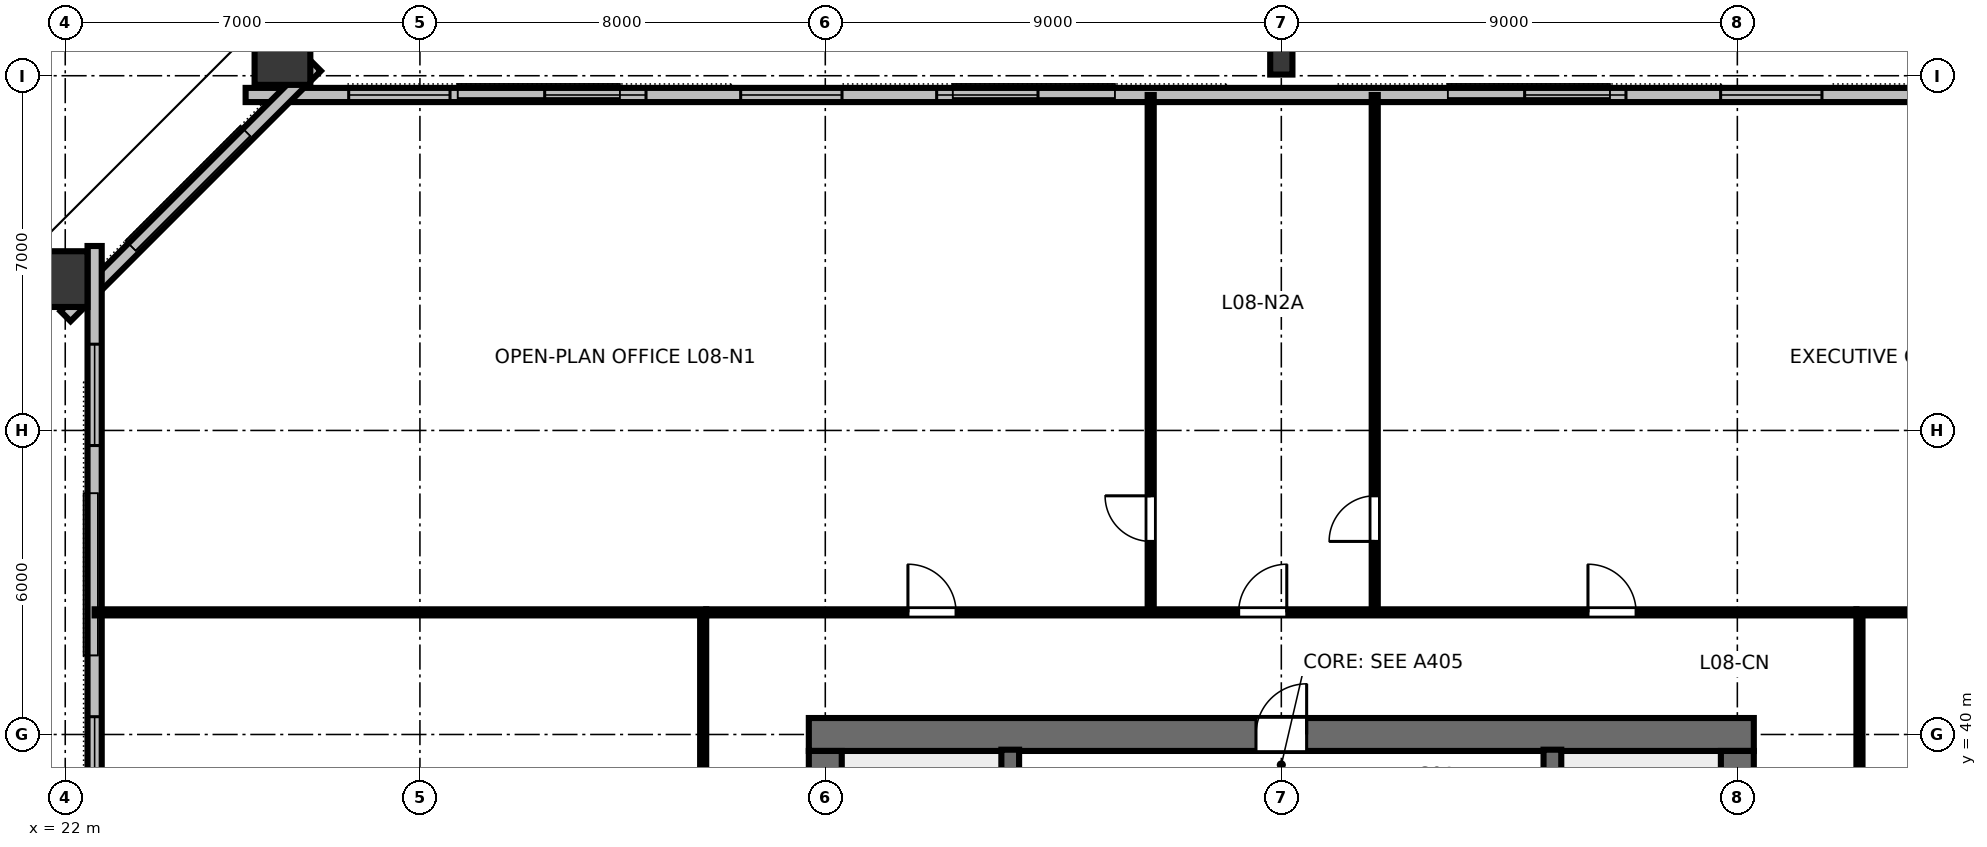
"""IFC4 building model, lengths in metres.
Left out: names, types, materials, properties, quantities, classifications, styles, units other than length and angle.
Written with IfcOpenShell. Run it as: python <this file> out.ifc"""

import sys

from ifc_helpers import new_model, si_unit, direction, frame, frame_2d, origin, origin_2d, place, context, subcontext, project, spatial, rectangle, hollow_rectangle, i_section, extrude, element, fill, save


model = new_model("IFC4")
c1 = context("Model", 3, precision=1e-05, world=origin(), true_north=direction((0.0, 1.0)))
c2 = subcontext(c1, "Body", "Model", "MODEL_VIEW")
j1 = project(units=[si_unit("LENGTHUNIT", "METRE"), si_unit("PLANEANGLEUNIT", "RADIAN")], contexts=[c1])
p1 = place(None, origin())
s1 = spatial("IfcSite", under=j1, at=p1, CompositionType="ELEMENT")
p2 = place(p1, origin())
s2 = spatial("IfcBuilding", under=s1, at=p2, CompositionType="ELEMENT")
p3 = place(p2, frame((0.0, 0.0, 35.2)))
s3 = spatial("IfcBuildingStorey", under=s2, at=p3, CompositionType="ELEMENT", Elevation=35.2)
p4 = place(p3, frame((36.675, 40.0, 0.0), z_axis=(0.0, 0.0, 1.0), x_axis=(1.0, 0.0, 0.0)))
e1 = element("IfcWall", 1, at=p4, inside=s3, PredefinedType="SHEAR", context=c2, shape_type="SweptSolid", body=[
    extrude(rectangle(XDim=18.65, YDim=0.65, at=frame_2d((9.325, 0.0))), origin(), (0.0, 0.0, 1.0), 3.36),
])
p5 = place(p4, frame((8.825, 0.0, 0.0)))
e2 = element("IfcOpeningElement", 2, at=p5, cuts=e1, PredefinedType="OPENING", context=c2, shape_type="SweptSolid", body=[
    extrude(rectangle(XDim=1.0, YDim=2.15, at=frame_2d((0.5, 1.075))), frame((0.0, 0.335, 0.0), z_axis=(0.0, -1.0, 0.0), x_axis=(1.0, 0.0, 0.0)), (0.0, 0.0, 1.0), 0.67),
])
p6 = place(p3, frame((37.0, 24.325, 0.0), z_axis=(0.0, 0.0, 1.0), x_axis=(0.0, 1.0, 0.0)))
e3 = element("IfcWall", 3, at=p6, inside=s3, PredefinedType="SHEAR", context=c2, shape_type="SweptSolid", body=[
    extrude(rectangle(XDim=15.35, YDim=0.65, at=frame_2d((7.675, 0.0))), origin(), (0.0, 0.0, 1.0), 3.36),
])
p7 = place(p6, frame((5.2, 0.0, 0.0)))
e4 = element("IfcOpeningElement", 4, at=p7, cuts=e3, PredefinedType="OPENING", context=c2, shape_type="SweptSolid", body=[
    extrude(rectangle(XDim=1.15, YDim=2.15, at=frame_2d((0.575, 1.075))), frame((0.0, 0.335, 0.0), z_axis=(0.0, -1.0, 0.0), x_axis=(1.0, 0.0, 0.0)), (0.0, 0.0, 1.0), 0.67),
])
p8 = place(p3, frame((55.0, 24.325, 0.0), z_axis=(0.0, 0.0, 1.0), x_axis=(0.0, 1.0, 0.0)))
e5 = element("IfcWall", 5, at=p8, inside=s3, PredefinedType="SHEAR", context=c2, shape_type="SweptSolid", body=[
    extrude(rectangle(XDim=15.35, YDim=0.65, at=frame_2d((7.675, 0.0))), origin(), (0.0, 0.0, 1.0), 3.36),
])
p9 = place(p8, frame((5.2, 0.0, 0.0)))
e6 = element("IfcOpeningElement", 6, at=p9, cuts=e5, PredefinedType="OPENING", context=c2, shape_type="SweptSolid", body=[
    extrude(rectangle(XDim=1.15, YDim=2.15, at=frame_2d((0.575, 1.075))), frame((0.0, 0.335, 0.0), z_axis=(0.0, -1.0, 0.0), x_axis=(1.0, 0.0, 0.0)), (0.0, 0.0, 1.0), 0.67),
])
p10 = place(p3, frame((46.0, 53.28, 0.0), z_axis=(0.0, 0.094885603902, 0.995488182839), x_axis=(-1.0, 0.0, 0.0)))
e7 = element("IfcColumn", 7, at=p10, inside=s3, PredefinedType="COLUMN", context=c2, shape_type="SweptSolid", body=[
    extrude(i_section(OverallWidth=0.439, OverallDepth=0.514, WebThickness=0.06, FlangeThickness=0.097, FilletRadius=0.025, at=origin_2d()), origin(), (0.0, 0.0, 1.0), 3.162),
])
p11 = place(p3, frame((26.287, 53.469, 0.0), z_axis=(-0.047968316961, 0.09439424431, 0.994378583442), x_axis=(-0.891494829719, -0.453030869351, 0.0)))
e8 = element("IfcColumn", 8, at=p11, inside=s3, PredefinedType="COLUMN", context=c2, shape_type="SweptSolid", body=[
    extrude(hollow_rectangle(XDim=1.1, YDim=1.3, WallThickness=0.07, at=origin_2d()), origin(), (0.0, 0.0, 1.0), 3.166),
])
p12 = place(p3, frame((21.789, 48.987, 0.0), z_axis=(-0.10994269781, 0.032281703141, 0.993413556803), x_axis=(0.953174231432, -0.279873863329, 0.114584052814)))
e9 = element("IfcColumn", 9, at=p12, inside=s3, PredefinedType="COLUMN", context=c2, shape_type="SweptSolid", body=[
    extrude(hollow_rectangle(XDim=1.1, YDim=1.3, WallThickness=0.07, at=origin_2d()), origin(), (0.0, 0.0, 1.0), 3.169),
])
p13 = place(p3, frame((66.44, 52.62, 0.0), z_axis=(0.0, 0.0, 1.0), x_axis=(-1.0, 0.0, 0.0)))
e10 = element("IfcWall", 10, at=p13, inside=s3, PredefinedType="STANDARD", context=c2, shape_type="SweptSolid", body=[
    extrude(rectangle(XDim=40.88, YDim=0.28, at=frame_2d((20.44, 0.0))), origin(), (0.0, 0.0, 1.0), 3.15),
])
p14 = place(p13, frame((2.034, 0.0, 0.8)))
e11 = element("IfcOpeningElement", 11, at=p14, cuts=e10, PredefinedType="OPENING", context=c2, shape_type="SweptSolid", body=[
    extrude(rectangle(XDim=2.0, YDim=1.95, at=frame_2d((1.0, 0.975))), frame((0.0, 0.15, 0.0), z_axis=(0.0, -1.0, 0.0), x_axis=(1.0, 0.0, 0.0)), (0.0, 0.0, 1.0), 0.3),
])
p15 = place(p13, frame((5.902, 0.0, 0.8)))
e12 = element("IfcOpeningElement", 12, at=p15, cuts=e10, PredefinedType="OPENING", context=c2, shape_type="SweptSolid", body=[
    extrude(rectangle(XDim=2.0, YDim=1.95, at=frame_2d((1.0, 0.975))), frame((0.0, 0.15, 0.0), z_axis=(0.0, -1.0, 0.0), x_axis=(1.0, 0.0, 0.0)), (0.0, 0.0, 1.0), 0.3),
])
p16 = place(p13, frame((9.77, 0.0, 0.8)))
e13 = element("IfcOpeningElement", 13, at=p16, cuts=e10, PredefinedType="OPENING", context=c2, shape_type="SweptSolid", body=[
    extrude(rectangle(XDim=2.0, YDim=1.95, at=frame_2d((1.0, 0.975))), frame((0.0, 0.15, 0.0), z_axis=(0.0, -1.0, 0.0), x_axis=(1.0, 0.0, 0.0)), (0.0, 0.0, 1.0), 0.3),
])
p17 = place(p13, frame((13.638, 0.0, 0.8)))
e14 = element("IfcOpeningElement", 14, at=p17, cuts=e10, PredefinedType="OPENING", context=c2, shape_type="SweptSolid", body=[
    extrude(rectangle(XDim=2.0, YDim=1.95, at=frame_2d((1.0, 0.975))), frame((0.0, 0.15, 0.0), z_axis=(0.0, -1.0, 0.0), x_axis=(1.0, 0.0, 0.0)), (0.0, 0.0, 1.0), 0.3),
])
p18 = place(p13, frame((25.242, 0.0, 0.8)))
e15 = element("IfcOpeningElement", 15, at=p18, cuts=e10, PredefinedType="OPENING", context=c2, shape_type="SweptSolid", body=[
    extrude(rectangle(XDim=2.0, YDim=1.95, at=frame_2d((1.0, 0.975))), frame((0.0, 0.15, 0.0), z_axis=(0.0, -1.0, 0.0), x_axis=(1.0, 0.0, 0.0)), (0.0, 0.0, 1.0), 0.3),
])
p19 = place(p13, frame((29.11, 0.0, 0.8)))
e16 = element("IfcOpeningElement", 16, at=p19, cuts=e10, PredefinedType="OPENING", context=c2, shape_type="SweptSolid", body=[
    extrude(rectangle(XDim=2.0, YDim=1.95, at=frame_2d((1.0, 0.975))), frame((0.0, 0.15, 0.0), z_axis=(0.0, -1.0, 0.0), x_axis=(1.0, 0.0, 0.0)), (0.0, 0.0, 1.0), 0.3),
])
p20 = place(p13, frame((32.978, 0.0, 0.8)))
e17 = element("IfcOpeningElement", 17, at=p20, cuts=e10, PredefinedType="OPENING", context=c2, shape_type="SweptSolid", body=[
    extrude(rectangle(XDim=2.0, YDim=1.95, at=frame_2d((1.0, 0.975))), frame((0.0, 0.15, 0.0), z_axis=(0.0, -1.0, 0.0), x_axis=(1.0, 0.0, 0.0)), (0.0, 0.0, 1.0), 0.3),
])
p21 = place(p13, frame((36.846, 0.0, 0.8)))
e18 = element("IfcOpeningElement", 18, at=p21, cuts=e10, PredefinedType="OPENING", context=c2, shape_type="SweptSolid", body=[
    extrude(rectangle(XDim=2.0, YDim=1.95, at=frame_2d((1.0, 0.975))), frame((0.0, 0.15, 0.0), z_axis=(0.0, -1.0, 0.0), x_axis=(1.0, 0.0, 0.0)), (0.0, 0.0, 1.0), 0.3),
])
p22 = place(p3, frame((26.946, 53.194, 0.0), z_axis=(0.0, 0.0, 1.0), x_axis=(-0.707106781187, -0.707106781187, 0.0)))
e19 = element("IfcWall", 19, at=p22, inside=s3, PredefinedType="STANDARD", context=c2, shape_type="SweptSolid", body=[
    extrude(rectangle(XDim=6.985, YDim=0.28, at=frame_2d((3.493, 0.0))), origin(), (0.0, 0.0, 1.0), 3.15),
])
p23 = place(p3, frame((22.58, 49.64, 0.0), z_axis=(0.0, 0.0, 1.0), x_axis=(0.0, -1.0, 0.0)))
e20 = element("IfcWall", 20, at=p23, inside=s3, PredefinedType="STANDARD", context=c2, shape_type="SweptSolid", body=[
    extrude(rectangle(XDim=35.28, YDim=0.28, at=frame_2d((17.64, 0.0))), origin(), (0.0, 0.0, 1.0), 3.15),
])
p24 = place(p23, frame((1.938, 0.0, 0.8)))
e21 = element("IfcOpeningElement", 21, at=p24, cuts=e20, PredefinedType="OPENING", context=c2, shape_type="SweptSolid", body=[
    extrude(rectangle(XDim=2.0, YDim=1.95, at=frame_2d((1.0, 0.975))), frame((0.0, 0.15, 0.0), z_axis=(0.0, -1.0, 0.0), x_axis=(1.0, 0.0, 0.0)), (0.0, 0.0, 1.0), 0.3),
])
p25 = place(p23, frame((9.289, 0.0, 0.8)))
e22 = element("IfcOpeningElement", 22, at=p25, cuts=e20, PredefinedType="OPENING", context=c2, shape_type="SweptSolid", body=[
    extrude(rectangle(XDim=2.0, YDim=1.95, at=frame_2d((1.0, 0.975))), frame((0.0, 0.15, 0.0), z_axis=(0.0, -1.0, 0.0), x_axis=(1.0, 0.0, 0.0)), (0.0, 0.0, 1.0), 0.3),
])
p26 = place(p23, frame((12.964, 0.0, 0.8)))
e23 = element("IfcOpeningElement", 23, at=p26, cuts=e20, PredefinedType="OPENING", context=c2, shape_type="SweptSolid", body=[
    extrude(rectangle(XDim=2.0, YDim=1.95, at=frame_2d((1.0, 0.975))), frame((0.0, 0.15, 0.0), z_axis=(0.0, -1.0, 0.0), x_axis=(1.0, 0.0, 0.0)), (0.0, 0.0, 1.0), 0.3),
])
p27 = place(p23, frame((23.991, 0.0, 0.8)))
e24 = element("IfcOpeningElement", 24, at=p27, cuts=e20, PredefinedType="OPENING", context=c2, shape_type="SweptSolid", body=[
    extrude(rectangle(XDim=2.0, YDim=1.95, at=frame_2d((1.0, 0.975))), frame((0.0, 0.15, 0.0), z_axis=(0.0, -1.0, 0.0), x_axis=(1.0, 0.0, 0.0)), (0.0, 0.0, 1.0), 0.3),
])
p28 = place(p23, frame((31.342, 0.0, 0.8)))
e25 = element("IfcOpeningElement", 25, at=p28, cuts=e20, PredefinedType="OPENING", context=c2, shape_type="SweptSolid", body=[
    extrude(rectangle(XDim=2.0, YDim=1.95, at=frame_2d((1.0, 0.975))), frame((0.0, 0.15, 0.0), z_axis=(0.0, -1.0, 0.0), x_axis=(1.0, 0.0, 0.0)), (0.0, 0.0, 1.0), 0.3),
])
for number, where, z_axis, x_axis in (
    (26, (40.65, 32.0, 0.0), (0.0, 0.0, 1.0), (0.0, 1.0, 0.0)),
    (27, (51.35, 32.0, 0.0), (0.0, 0.0, 1.0), (0.0, 1.0, 0.0)),
):
    element("IfcWall", number, at=place(p3, frame(where, z_axis=z_axis, x_axis=x_axis)), inside=s3, PredefinedType="SHEAR", context=c2, shape_type="SweptSolid", body=[
        extrude(rectangle(XDim=7.7, YDim=0.35, at=frame_2d((3.85, 0.0))), origin(), (0.0, 0.0, 1.0), 3.6),
    ])
p29 = place(p3, frame((43.422, 42.41, 0.0), z_axis=(0.0, 0.0, 1.0), x_axis=(0.0, 1.0, 0.0)))
e28 = element("IfcWall", 28, at=p29, inside=s3, PredefinedType="PARTITIONING", context=c2, shape_type="SweptSolid", body=[
    extrude(rectangle(XDim=10.21, YDim=0.12, at=frame_2d((5.105, 0.0))), origin(), (0.0, 0.0, 1.0), 2.43),
])
p30 = place(p29, frame((1.4, 0.0, 0.0)))
e29 = element("IfcOpeningElement", 29, at=p30, cuts=e28, PredefinedType="OPENING", context=c2, shape_type="SweptSolid", body=[
    extrude(rectangle(XDim=0.9, YDim=2.15, at=frame_2d((0.45, 1.075))), frame((0.0, 0.07, 0.0), z_axis=(0.0, -1.0, 0.0), x_axis=(1.0, 0.0, 0.0)), (0.0, 0.0, 1.0), 0.14),
])
p31 = place(p3, frame((47.844, 42.41, 0.0), z_axis=(0.0, 0.0, 1.0), x_axis=(0.0, 1.0, 0.0)))
e30 = element("IfcWall", 30, at=p31, inside=s3, PredefinedType="PARTITIONING", context=c2, shape_type="SweptSolid", body=[
    extrude(rectangle(XDim=10.21, YDim=0.12, at=frame_2d((5.105, 0.0))), origin(), (0.0, 0.0, 1.0), 2.43),
])
p32 = place(p31, frame((1.4, 0.0, 0.0)))
e31 = element("IfcOpeningElement", 31, at=p32, cuts=e30, PredefinedType="OPENING", context=c2, shape_type="SweptSolid", body=[
    extrude(rectangle(XDim=0.9, YDim=2.15, at=frame_2d((0.45, 1.075))), frame((0.0, 0.07, 0.0), z_axis=(0.0, -1.0, 0.0), x_axis=(1.0, 0.0, 0.0)), (0.0, 0.0, 1.0), 0.14),
])
p33 = place(p3, frame((34.65, 42.41, 0.0), z_axis=(0.0, 0.0, 1.0), x_axis=(1.0, 0.0, 0.0)))
e32 = element("IfcWall", 32, at=p33, inside=s3, PredefinedType="PARTITIONING", context=c2, shape_type="SweptSolid", body=[
    extrude(rectangle(XDim=22.7, YDim=0.12, at=frame_2d((11.35, 0.0))), origin(), (0.0, 0.0, 1.0), 2.43),
])
p34 = place(p33, frame((3.981, 0.0, 0.0)))
e33 = element("IfcOpeningElement", 33, at=p34, cuts=e32, PredefinedType="OPENING", context=c2, shape_type="SweptSolid", body=[
    extrude(rectangle(XDim=0.95, YDim=2.15, at=frame_2d((0.475, 1.075))), frame((0.0, 0.07, 0.0), z_axis=(0.0, -1.0, 0.0), x_axis=(1.0, 0.0, 0.0)), (0.0, 0.0, 1.0), 0.14),
])
p35 = place(p33, frame((10.508, 0.0, 0.0)))
e34 = element("IfcOpeningElement", 34, at=p35, cuts=e32, PredefinedType="OPENING", context=c2, shape_type="SweptSolid", body=[
    extrude(rectangle(XDim=0.95, YDim=2.15, at=frame_2d((0.475, 1.075))), frame((0.0, 0.07, 0.0), z_axis=(0.0, -1.0, 0.0), x_axis=(1.0, 0.0, 0.0)), (0.0, 0.0, 1.0), 0.14),
])
p36 = place(p33, frame((17.402, 0.0, 0.0)))
e35 = element("IfcOpeningElement", 35, at=p36, cuts=e32, PredefinedType="OPENING", context=c2, shape_type="SweptSolid", body=[
    extrude(rectangle(XDim=0.95, YDim=2.15, at=frame_2d((0.475, 1.075))), frame((0.0, 0.07, 0.0), z_axis=(0.0, -1.0, 0.0), x_axis=(1.0, 0.0, 0.0)), (0.0, 0.0, 1.0), 0.14),
])
p37 = place(p3, frame((34.59, 21.65, 0.0), z_axis=(0.0, 0.0, 1.0), x_axis=(0.0, 1.0, 0.0)))
e36 = element("IfcWall", 36, at=p37, inside=s3, PredefinedType="PARTITIONING", context=c2, shape_type="SweptSolid", body=[
    extrude(rectangle(XDim=20.7, YDim=0.12, at=frame_2d((10.35, 0.0))), origin(), (0.0, 0.0, 1.0), 2.43),
])
p38 = place(p37, frame((3.161, 0.0, 0.0)))
e37 = element("IfcOpeningElement", 37, at=p38, cuts=e36, PredefinedType="OPENING", context=c2, shape_type="SweptSolid", body=[
    extrude(rectangle(XDim=0.95, YDim=2.15, at=frame_2d((0.475, 1.075))), frame((0.0, 0.07, 0.0), z_axis=(0.0, -1.0, 0.0), x_axis=(1.0, 0.0, 0.0)), (0.0, 0.0, 1.0), 0.14),
])
p39 = place(p37, frame((13.311, 0.0, 0.0)))
e38 = element("IfcOpeningElement", 38, at=p39, cuts=e36, PredefinedType="OPENING", context=c2, shape_type="SweptSolid", body=[
    extrude(rectangle(XDim=0.95, YDim=2.15, at=frame_2d((0.475, 1.075))), frame((0.0, 0.07, 0.0), z_axis=(0.0, -1.0, 0.0), x_axis=(1.0, 0.0, 0.0)), (0.0, 0.0, 1.0), 0.14),
])
p40 = place(p3, frame((57.41, 21.65, 0.0), z_axis=(0.0, 0.0, 1.0), x_axis=(0.0, 1.0, 0.0)))
e39 = element("IfcWall", 39, at=p40, inside=s3, PredefinedType="PARTITIONING", context=c2, shape_type="SweptSolid", body=[
    extrude(rectangle(XDim=20.7, YDim=0.12, at=frame_2d((10.35, 0.0))), origin(), (0.0, 0.0, 1.0), 2.43),
])
p41 = place(p40, frame((5.31, 0.0, 0.0)))
e40 = element("IfcOpeningElement", 40, at=p41, cuts=e39, PredefinedType="OPENING", context=c2, shape_type="SweptSolid", body=[
    extrude(rectangle(XDim=0.95, YDim=2.15, at=frame_2d((0.475, 1.075))), frame((0.0, 0.07, 0.0), z_axis=(0.0, -1.0, 0.0), x_axis=(1.0, 0.0, 0.0)), (0.0, 0.0, 1.0), 0.14),
])
p42 = place(p40, frame((15.459, 0.0, 0.0)))
e41 = element("IfcOpeningElement", 41, at=p42, cuts=e39, PredefinedType="OPENING", context=c2, shape_type="SweptSolid", body=[
    extrude(rectangle(XDim=0.95, YDim=2.15, at=frame_2d((0.475, 1.075))), frame((0.0, 0.07, 0.0), z_axis=(0.0, -1.0, 0.0), x_axis=(1.0, 0.0, 0.0)), (0.0, 0.0, 1.0), 0.14),
])
for number, where, z_axis, x_axis in (
    (42, (34.65, 42.41, 0.0), (0.0, 0.0, 1.0), (-1.0, 0.0, 0.0)),
    (43, (57.35, 42.41, 0.0), (0.0, 0.0, 1.0), (1.0, 0.0, 0.0)),
):
    element("IfcWall", number, at=place(p3, frame(where, z_axis=z_axis, x_axis=x_axis)), inside=s3, PredefinedType="PARTITIONING", context=c2, shape_type="SweptSolid", body=[
        extrude(rectangle(XDim=12.07, YDim=0.12, at=frame_2d((6.035, 0.0))), origin(), (0.0, 0.0, 1.0), 2.43),
    ])
p43 = place(p16, origin())
e44 = element("IfcWindow", 44, at=p43, inside=s3, PartitioningType="SINGLE_PANEL", PredefinedType="WINDOW", context=c2, shape_type="SweptSolid", body=[
    extrude(rectangle(XDim=2.0, YDim=1.95, at=frame_2d((1.0, 0.975))), frame((0.0, 0.03, 0.0), z_axis=(0.0, -1.0, 0.0), x_axis=(1.0, 0.0, 0.0)), (0.0, 0.0, 1.0), 0.06),
])
fill(e13, e44)
p44 = place(p17, origin())
e45 = element("IfcWindow", 45, at=p44, inside=s3, PartitioningType="SINGLE_PANEL", PredefinedType="WINDOW", context=c2, shape_type="SweptSolid", body=[
    extrude(rectangle(XDim=2.0, YDim=1.95, at=frame_2d((1.0, 0.975))), frame((0.0, 0.03, 0.0), z_axis=(0.0, -1.0, 0.0), x_axis=(1.0, 0.0, 0.0)), (0.0, 0.0, 1.0), 0.06),
])
fill(e14, e45)
p45 = place(p18, origin())
e46 = element("IfcWindow", 46, at=p45, inside=s3, PartitioningType="SINGLE_PANEL", PredefinedType="WINDOW", context=c2, shape_type="SweptSolid", body=[
    extrude(rectangle(XDim=2.0, YDim=1.95, at=frame_2d((1.0, 0.975))), frame((0.0, 0.03, 0.0), z_axis=(0.0, -1.0, 0.0), x_axis=(1.0, 0.0, 0.0)), (0.0, 0.0, 1.0), 0.06),
])
fill(e15, e46)
p46 = place(p19, origin())
e47 = element("IfcWindow", 47, at=p46, inside=s3, PartitioningType="SINGLE_PANEL", PredefinedType="WINDOW", context=c2, shape_type="SweptSolid", body=[
    extrude(rectangle(XDim=2.0, YDim=1.95, at=frame_2d((1.0, 0.975))), frame((0.0, 0.03, 0.0), z_axis=(0.0, -1.0, 0.0), x_axis=(1.0, 0.0, 0.0)), (0.0, 0.0, 1.0), 0.06),
])
fill(e16, e47)
p47 = place(p20, origin())
e48 = element("IfcWindow", 48, at=p47, inside=s3, PartitioningType="SINGLE_PANEL", PredefinedType="WINDOW", context=c2, shape_type="SweptSolid", body=[
    extrude(rectangle(XDim=2.0, YDim=1.95, at=frame_2d((1.0, 0.975))), frame((0.0, 0.03, 0.0), z_axis=(0.0, -1.0, 0.0), x_axis=(1.0, 0.0, 0.0)), (0.0, 0.0, 1.0), 0.06),
])
fill(e17, e48)
p48 = place(p21, origin())
e49 = element("IfcWindow", 49, at=p48, inside=s3, PartitioningType="SINGLE_PANEL", PredefinedType="WINDOW", context=c2, shape_type="SweptSolid", body=[
    extrude(rectangle(XDim=2.0, YDim=1.95, at=frame_2d((1.0, 0.975))), frame((0.0, 0.03, 0.0), z_axis=(0.0, -1.0, 0.0), x_axis=(1.0, 0.0, 0.0)), (0.0, 0.0, 1.0), 0.06),
])
fill(e18, e49)
p49 = place(p24, origin())
e50 = element("IfcWindow", 50, at=p49, inside=s3, PartitioningType="SINGLE_PANEL", PredefinedType="WINDOW", context=c2, shape_type="SweptSolid", body=[
    extrude(rectangle(XDim=2.0, YDim=1.95, at=frame_2d((1.0, 0.975))), frame((0.0, 0.03, 0.0), z_axis=(0.0, -1.0, 0.0), x_axis=(1.0, 0.0, 0.0)), (0.0, 0.0, 1.0), 0.06),
])
fill(e21, e50)
p50 = place(p25, origin())
e51 = element("IfcWindow", 51, at=p50, inside=s3, PartitioningType="SINGLE_PANEL", PredefinedType="WINDOW", context=c2, shape_type="SweptSolid", body=[
    extrude(rectangle(XDim=2.0, YDim=1.95, at=frame_2d((1.0, 0.975))), frame((0.0, 0.03, 0.0), z_axis=(0.0, -1.0, 0.0), x_axis=(1.0, 0.0, 0.0)), (0.0, 0.0, 1.0), 0.06),
])
fill(e22, e51)
p51 = place(p5, origin())
e52 = element("IfcDoor", 52, at=p51, inside=s3, OperationType="SINGLE_SWING_RIGHT", PredefinedType="DOOR", context=c2, shape_type="SweptSolid", body=[
    extrude(rectangle(XDim=1.0, YDim=2.15, at=frame_2d((0.5, 1.075))), frame((0.0, 0.025, 0.0), z_axis=(0.0, -1.0, 0.0), x_axis=(1.0, 0.0, 0.0)), (0.0, 0.0, 1.0), 0.05),
])
fill(e2, e52)
p52 = place(p30, origin())
e53 = element("IfcDoor", 53, at=p52, inside=s3, OperationType="SINGLE_SWING_RIGHT", PredefinedType="DOOR", context=c2, shape_type="SweptSolid", body=[
    extrude(rectangle(XDim=0.9, YDim=2.15, at=frame_2d((0.45, 1.075))), frame((0.0, 0.025, 0.0), z_axis=(0.0, -1.0, 0.0), x_axis=(1.0, 0.0, 0.0)), (0.0, 0.0, 1.0), 0.05),
])
fill(e29, e53)
p53 = place(p32, origin())
e54 = element("IfcDoor", 54, at=p53, inside=s3, OperationType="SINGLE_SWING_LEFT", PredefinedType="DOOR", context=c2, shape_type="SweptSolid", body=[
    extrude(rectangle(XDim=0.9, YDim=2.15, at=frame_2d((0.45, 1.075))), frame((0.0, 0.025, 0.0), z_axis=(0.0, -1.0, 0.0), x_axis=(1.0, 0.0, 0.0)), (0.0, 0.0, 1.0), 0.05),
])
fill(e31, e54)
p54 = place(p34, origin())
e55 = element("IfcDoor", 55, at=p54, inside=s3, OperationType="SINGLE_SWING_LEFT", PredefinedType="DOOR", context=c2, shape_type="SweptSolid", body=[
    extrude(rectangle(XDim=0.95, YDim=2.15, at=frame_2d((0.475, 1.075))), frame((0.0, 0.025, 0.0), z_axis=(0.0, -1.0, 0.0), x_axis=(1.0, 0.0, 0.0)), (0.0, 0.0, 1.0), 0.05),
])
fill(e33, e55)
p55 = place(p35, origin())
e56 = element("IfcDoor", 56, at=p55, inside=s3, OperationType="SINGLE_SWING_RIGHT", PredefinedType="DOOR", context=c2, shape_type="SweptSolid", body=[
    extrude(rectangle(XDim=0.95, YDim=2.15, at=frame_2d((0.475, 1.075))), frame((0.0, 0.025, 0.0), z_axis=(0.0, -1.0, 0.0), x_axis=(1.0, 0.0, 0.0)), (0.0, 0.0, 1.0), 0.05),
])
fill(e34, e56)
p56 = place(p36, origin())
e57 = element("IfcDoor", 57, at=p56, inside=s3, OperationType="SINGLE_SWING_LEFT", PredefinedType="DOOR", context=c2, shape_type="SweptSolid", body=[
    extrude(rectangle(XDim=0.95, YDim=2.15, at=frame_2d((0.475, 1.075))), frame((0.0, 0.025, 0.0), z_axis=(0.0, -1.0, 0.0), x_axis=(1.0, 0.0, 0.0)), (0.0, 0.0, 1.0), 0.05),
])
fill(e35, e57)
save(model, sys.argv[1])
